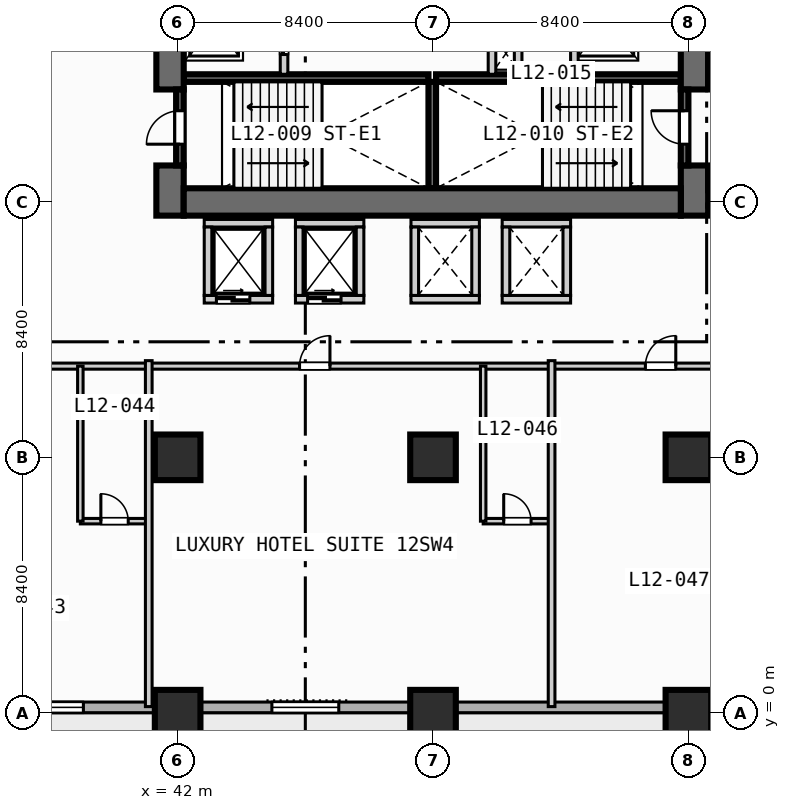
"""IFC4 building model, lengths in metres.
Left out: names, types, materials, properties, quantities, classifications, styles, units other than length and angle.
Written with IfcOpenShell. Run it as: python <this file> out.ifc"""

import sys

from ifc_helpers import new_model, si_unit, direction, frame, frame_2d, origin, origin_2d, place, context, subcontext, project, spatial, rectangle, extrude, element, fill, save


model = new_model("IFC4")
c1 = context("Model", 3, precision=1e-05, world=origin(), true_north=direction((0.0, 1.0)))
c2 = subcontext(c1, "Body", "Model", "MODEL_VIEW")
j1 = project(units=[si_unit("LENGTHUNIT", "METRE"), si_unit("PLANEANGLEUNIT", "RADIAN")], contexts=[c1])
p1 = place(None, origin())
s1 = spatial("IfcSite", under=j1, at=p1, CompositionType="ELEMENT")
p2 = place(p1, origin())
s2 = spatial("IfcBuilding", under=s1, at=p2, CompositionType="ELEMENT")
p3 = place(p2, frame((0.0, 0.0, 54.8)))
s3 = spatial("IfcBuildingStorey", under=s2, at=p3, CompositionType="ELEMENT", Elevation=54.8)
for number, where, z_axis, x_axis in (
    (1, (42.2, 20.875, 0.0), (0.0, 0.0, 1.0), (1.0, 0.0, 0.0)),
    (2, (50.5, 20.875, 0.0), (0.0, 0.0, 1.0), (1.0, 0.0, 0.0)),
):
    element("IfcWall", number, at=place(p3, frame(where, z_axis=z_axis, x_axis=x_axis)), inside=s3, PredefinedType="SOLIDWALL", context=c2, shape_type="SweptSolid", body=[
        extrude(rectangle(XDim=8.05, YDim=0.25, at=frame_2d((4.025, 0.0))), origin(), (0.0, 0.0, 1.0), 3.55),
    ])
p4 = place(p3, frame((50.375, 17.25, 0.0), z_axis=(0.0, 0.0, 1.0), x_axis=(0.0, 1.0, 0.0)))
e3 = element("IfcWall", 3, at=p4, inside=s3, PredefinedType="SOLIDWALL", context=c2, shape_type="SweptSolid", body=[
    extrude(rectangle(XDim=3.5, YDim=0.25, at=frame_2d((1.75, 0.0))), origin(), (0.0, 0.0, 1.0), 3.55),
])
p5 = place(p3, frame((41.75, 16.35, 0.0), z_axis=(0.0, 0.0, 1.0), x_axis=(0.0, 1.0, 0.0)))
e4 = element("IfcWall", 4, at=p5, inside=s3, PredefinedType="SHEAR", context=c2, shape_type="SweptSolid", body=[
    extrude(rectangle(XDim=1.65, YDim=0.9, at=frame_2d((0.825, 0.0))), origin(), (0.0, 0.0, 1.0), 3.55),
])
p6 = place(p3, frame((41.75, 20.5, 0.0), z_axis=(0.0, 0.0, 1.0), x_axis=(0.0, 1.0, 0.0)))
e5 = element("IfcWall", 5, at=p6, inside=s3, PredefinedType="SHEAR", context=c2, shape_type="SweptSolid", body=[
    extrude(rectangle(XDim=5.15, YDim=0.9, at=frame_2d((2.575, 0.0))), origin(), (0.0, 0.0, 1.0), 3.55),
])
p7 = place(p3, frame((59.0, 16.35, 0.0), z_axis=(0.0, 0.0, 1.0), x_axis=(0.0, 1.0, 0.0)))
e6 = element("IfcWall", 6, at=p7, inside=s3, PredefinedType="SHEAR", context=c2, shape_type="SweptSolid", body=[
    extrude(rectangle(XDim=1.65, YDim=0.9, at=frame_2d((0.825, 0.0))), origin(), (0.0, 0.0, 1.0), 3.55),
])
p8 = place(p3, frame((59.0, 20.5, 0.0), z_axis=(0.0, 0.0, 1.0), x_axis=(0.0, 1.0, 0.0)))
e7 = element("IfcWall", 7, at=p8, inside=s3, PredefinedType="SHEAR", context=c2, shape_type="SweptSolid", body=[
    extrude(rectangle(XDim=5.15, YDim=0.9, at=frame_2d((2.575, 0.0))), origin(), (0.0, 0.0, 1.0), 3.55),
])
p9 = place(p3, frame((42.2, 16.8, 0.0), z_axis=(0.0, 0.0, 1.0), x_axis=(1.0, 0.0, 0.0)))
e8 = element("IfcWall", 8, at=p9, inside=s3, PredefinedType="SHEAR", context=c2, shape_type="SweptSolid", body=[
    extrude(rectangle(XDim=16.35, YDim=0.9, at=frame_2d((8.175, 0.0))), origin(), (0.0, 0.0, 1.0), 3.55),
])
for number, where, z_axis, x_axis in (
    (9, (42.0, 0.0, 0.0), (0.0, 0.0, 1.0), (1.0, 0.0, 0.0)),
    (10, (42.0, 8.4, 0.0), (0.0, 0.0, 1.0), (1.0, 0.0, 0.0)),
    (11, (50.4, 0.0, 0.0), (0.0, 0.0, 1.0), (1.0, 0.0, 0.0)),
    (12, (50.4, 8.4, 0.0), (0.0, 0.0, 1.0), (1.0, 0.0, 0.0)),
    (13, (58.8, 0.0, 0.0), (0.0, 0.0, 1.0), (1.0, 0.0, 0.0)),
    (14, (58.8, 8.4, 0.0), (0.0, 0.0, 1.0), (1.0, 0.0, 0.0)),
):
    element("IfcColumn", number, at=place(p3, frame(where, z_axis=z_axis, x_axis=x_axis)), inside=s3, PredefinedType="COLUMN", context=c2, shape_type="SweptSolid", body=[
        extrude(rectangle(XDim=1.5, YDim=1.5, at=origin_2d()), origin(), (0.0, 0.0, 1.0), 3.8),
    ])
p10 = place(p3, frame((89.225, 0.175, 0.0), z_axis=(0.0, 0.0, 1.0), x_axis=(-1.0, 0.0, 0.0)))
e15 = element("IfcWall", 15, at=p10, inside=s3, PredefinedType="STANDARD", context=c2, shape_type="SweptSolid", body=[
    extrude(rectangle(XDim=86.05, YDim=0.35, at=frame_2d((43.025, 0.0))), origin(), (0.0, 0.0, 1.0), 3.55),
])
p11 = place(p10, frame((69.025, 0.0, 0.0)))
e16 = element("IfcOpeningElement", 16, at=p11, cuts=e15, PredefinedType="OPENING", context=c2, shape_type="SweptSolid", body=[
    extrude(rectangle(XDim=1.4, YDim=2.2, at=frame_2d((0.7, 1.1))), frame((0.0, 0.185, 0.0), z_axis=(0.0, -1.0, 0.0), x_axis=(1.0, 0.0, 0.0)), (0.0, 0.0, 1.0), 0.37),
])
p12 = place(p10, frame((58.725, 0.0, 0.85)))
e17 = element("IfcOpeningElement", 17, at=p12, cuts=e15, PredefinedType="OPENING", context=c2, shape_type="SweptSolid", body=[
    extrude(rectangle(XDim=2.2, YDim=1.8, at=frame_2d((1.1, 0.9))), frame((0.0, 0.185, 0.0), z_axis=(0.0, -1.0, 0.0), x_axis=(1.0, 0.0, 0.0)), (0.0, 0.0, 1.0), 0.37),
])
p13 = place(p10, frame((50.325, 0.0, 0.85)))
e18 = element("IfcOpeningElement", 18, at=p13, cuts=e15, PredefinedType="OPENING", context=c2, shape_type="SweptSolid", body=[
    extrude(rectangle(XDim=2.2, YDim=1.8, at=frame_2d((1.1, 0.9))), frame((0.0, 0.185, 0.0), z_axis=(0.0, -1.0, 0.0), x_axis=(1.0, 0.0, 0.0)), (0.0, 0.0, 1.0), 0.37),
])
p14 = place(p10, frame((41.925, 0.0, 0.85)))
e19 = element("IfcOpeningElement", 19, at=p14, cuts=e15, PredefinedType="OPENING", context=c2, shape_type="SweptSolid", body=[
    extrude(rectangle(XDim=2.2, YDim=1.8, at=frame_2d((1.1, 0.9))), frame((0.0, 0.185, 0.0), z_axis=(0.0, -1.0, 0.0), x_axis=(1.0, 0.0, 0.0)), (0.0, 0.0, 1.0), 0.37),
])
p15 = place(p10, frame((27.775, 0.0, 0.85)))
e20 = element("IfcOpeningElement", 20, at=p15, cuts=e15, PredefinedType="OPENING", context=c2, shape_type="SweptSolid", body=[
    extrude(rectangle(XDim=1.8, YDim=1.8, at=frame_2d((0.9, 0.9))), frame((0.0, 0.185, 0.0), z_axis=(0.0, -1.0, 0.0), x_axis=(1.0, 0.0, 0.0)), (0.0, 0.0, 1.0), 0.37),
])
p16 = place(p3, frame((42.075, 18.0, 0.0), z_axis=(0.0, 0.0, 1.0), x_axis=(0.0, 1.0, 0.0)))
e21 = element("IfcWall", 21, at=p16, inside=s3, PredefinedType="SOLIDWALL", context=c2, shape_type="SweptSolid", body=[
    extrude(rectangle(XDim=2.5, YDim=0.25, at=frame_2d((1.25, 0.0))), origin(), (0.0, 0.0, 1.0), 3.55),
])
p17 = place(p16, frame((0.7, 0.0, 0.0)))
e22 = element("IfcOpeningElement", 22, at=p17, cuts=e21, PredefinedType="OPENING", context=c2, shape_type="SweptSolid", body=[
    extrude(rectangle(XDim=1.1, YDim=2.15, at=frame_2d((0.55, 1.075))), frame((0.0, 0.135, 0.0), z_axis=(0.0, -1.0, 0.0), x_axis=(1.0, 0.0, 0.0)), (0.0, 0.0, 1.0), 0.27),
])
p18 = place(p3, frame((58.675, 18.0, 0.0), z_axis=(0.0, 0.0, 1.0), x_axis=(0.0, 1.0, 0.0)))
e23 = element("IfcWall", 23, at=p18, inside=s3, PredefinedType="SOLIDWALL", context=c2, shape_type="SweptSolid", body=[
    extrude(rectangle(XDim=2.5, YDim=0.25, at=frame_2d((1.25, 0.0))), origin(), (0.0, 0.0, 1.0), 3.55),
])
p19 = place(p18, frame((0.7, 0.0, 0.0)))
e24 = element("IfcOpeningElement", 24, at=p19, cuts=e23, PredefinedType="OPENING", context=c2, shape_type="SweptSolid", body=[
    extrude(rectangle(XDim=1.1, YDim=2.15, at=frame_2d((0.55, 1.075))), frame((0.0, 0.135, 0.0), z_axis=(0.0, -1.0, 0.0), x_axis=(1.0, 0.0, 0.0)), (0.0, 0.0, 1.0), 0.27),
])
p20 = place(p3, frame((45.5, 21.0, 0.0), z_axis=(0.0, 0.0, 1.0), x_axis=(0.0, 1.0, 0.0)))
e25 = element("IfcWall", 25, at=p20, inside=s3, PredefinedType="SOLIDWALL", context=c2, shape_type="SweptSolid", body=[
    extrude(rectangle(XDim=4.15, YDim=0.25, at=frame_2d((2.075, 0.0))), origin(), (0.0, 0.0, 1.0), 3.55),
])
p21 = place(p20, frame((0.65, 0.0, 0.0)))
e26 = element("IfcOpeningElement", 26, at=p21, cuts=e25, PredefinedType="OPENING", context=c2, shape_type="SweptSolid", body=[
    extrude(rectangle(XDim=1.1, YDim=2.15, at=frame_2d((0.55, 1.075))), frame((0.0, 0.135, 0.0), z_axis=(0.0, -1.0, 0.0), x_axis=(1.0, 0.0, 0.0)), (0.0, 0.0, 1.0), 0.27),
])
p22 = place(p3, frame((52.34, 21.0, 0.0), z_axis=(0.0, 0.0, 1.0), x_axis=(0.0, 1.0, 0.0)))
e27 = element("IfcWall", 27, at=p22, inside=s3, PredefinedType="SOLIDWALL", context=c2, shape_type="SweptSolid", body=[
    extrude(rectangle(XDim=3.75, YDim=0.25, at=frame_2d((1.875, 0.0))), origin(), (0.0, 0.0, 1.0), 3.55),
])
p23 = place(p3, frame((55.05, 21.0, 0.0), z_axis=(0.0, 0.0, 1.0), x_axis=(0.0, 1.0, 0.0)))
e28 = element("IfcWall", 28, at=p23, inside=s3, PredefinedType="SOLIDWALL", context=c2, shape_type="SweptSolid", body=[
    extrude(rectangle(XDim=4.15, YDim=0.25, at=frame_2d((2.075, 0.0))), origin(), (0.0, 0.0, 1.0), 3.55),
])
p24 = place(p23, frame((1.85, 0.0, 0.0)))
e29 = element("IfcOpeningElement", 29, at=p24, cuts=e28, PredefinedType="OPENING", context=c2, shape_type="SweptSolid", body=[
    extrude(rectangle(XDim=1.1, YDim=2.15, at=frame_2d((0.55, 1.075))), frame((0.0, 0.135, 0.0), z_axis=(0.0, -1.0, 0.0), x_axis=(1.0, 0.0, 0.0)), (0.0, 0.0, 1.0), 0.27),
])
p25 = place(p3, frame((53.2, 21.0, 0.0), z_axis=(0.0, 0.0, 1.0), x_axis=(0.0, 1.0, 0.0)))
e30 = element("IfcWall", 30, at=p25, inside=s3, PredefinedType="SOLIDWALL", context=c2, shape_type="SweptSolid", body=[
    extrude(rectangle(XDim=1.3, YDim=0.25, at=frame_2d((0.65, 0.0))), origin(), (0.0, 0.0, 1.0), 3.55),
])
p26 = place(p3, frame((42.875, 13.6, 0.0), z_axis=(0.0, 0.0, 1.0), x_axis=(1.0, 0.0, 0.0)))
e31 = element("IfcWall", 31, at=p26, inside=s3, PredefinedType="SOLIDWALL", context=c2, shape_type="SweptSolid", body=[
    extrude(rectangle(XDim=2.25, YDim=0.25, at=frame_2d((1.125, 0.0))), origin(), (0.0, 0.0, 1.0), 3.55),
])
p27 = place(p26, frame((0.4, 0.0, 0.0)))
e32 = element("IfcOpeningElement", 32, at=p27, cuts=e31, PredefinedType="OPENING", context=c2, shape_type="SweptSolid", body=[
    extrude(rectangle(XDim=1.1, YDim=2.15, at=frame_2d((0.55, 1.075))), frame((0.0, 0.135, 0.0), z_axis=(0.0, -1.0, 0.0), x_axis=(1.0, 0.0, 0.0)), (0.0, 0.0, 1.0), 0.27),
])
for number, where, z_axis, x_axis in (
    (33, (42.875, 16.1, 0.0), (0.0, 0.0, 1.0), (1.0, 0.0, 0.0)),
    (34, (43.0, 13.725, 0.0), (0.0, 0.0, 1.0), (0.0, 1.0, 0.0)),
    (35, (45.0, 13.725, 0.0), (0.0, 0.0, 1.0), (0.0, 1.0, 0.0)),
):
    element("IfcWall", number, at=place(p3, frame(where, z_axis=z_axis, x_axis=x_axis)), inside=s3, PredefinedType="SOLIDWALL", context=c2, shape_type="SweptSolid", body=[
        extrude(rectangle(XDim=2.25, YDim=0.25, at=frame_2d((1.125, 0.0))), origin(), (0.0, 0.0, 1.0), 3.55),
    ])
p28 = place(p3, frame((45.875, 13.6, 0.0), z_axis=(0.0, 0.0, 1.0), x_axis=(1.0, 0.0, 0.0)))
e36 = element("IfcWall", 36, at=p28, inside=s3, PredefinedType="SOLIDWALL", context=c2, shape_type="SweptSolid", body=[
    extrude(rectangle(XDim=2.25, YDim=0.25, at=frame_2d((1.125, 0.0))), origin(), (0.0, 0.0, 1.0), 3.55),
])
p29 = place(p28, frame((0.4, 0.0, 0.0)))
e37 = element("IfcOpeningElement", 37, at=p29, cuts=e36, PredefinedType="OPENING", context=c2, shape_type="SweptSolid", body=[
    extrude(rectangle(XDim=1.1, YDim=2.15, at=frame_2d((0.55, 1.075))), frame((0.0, 0.135, 0.0), z_axis=(0.0, -1.0, 0.0), x_axis=(1.0, 0.0, 0.0)), (0.0, 0.0, 1.0), 0.27),
])
for number, where, z_axis, x_axis in (
    (38, (45.875, 16.1, 0.0), (0.0, 0.0, 1.0), (1.0, 0.0, 0.0)),
    (39, (46.0, 13.725, 0.0), (0.0, 0.0, 1.0), (0.0, 1.0, 0.0)),
    (40, (48.0, 13.725, 0.0), (0.0, 0.0, 1.0), (0.0, 1.0, 0.0)),
    (41, (49.675, 13.6, 0.0), (0.0, 0.0, 1.0), (1.0, 0.0, 0.0)),
    (42, (49.675, 16.1, 0.0), (0.0, 0.0, 1.0), (1.0, 0.0, 0.0)),
    (43, (49.8, 13.725, 0.0), (0.0, 0.0, 1.0), (0.0, 1.0, 0.0)),
    (44, (51.8, 13.725, 0.0), (0.0, 0.0, 1.0), (0.0, 1.0, 0.0)),
    (45, (52.675, 13.6, 0.0), (0.0, 0.0, 1.0), (1.0, 0.0, 0.0)),
    (46, (52.675, 16.1, 0.0), (0.0, 0.0, 1.0), (1.0, 0.0, 0.0)),
    (47, (52.8, 13.725, 0.0), (0.0, 0.0, 1.0), (0.0, 1.0, 0.0)),
    (48, (54.8, 13.725, 0.0), (0.0, 0.0, 1.0), (0.0, 1.0, 0.0)),
):
    element("IfcWall", number, at=place(p3, frame(where, z_axis=z_axis, x_axis=x_axis)), inside=s3, PredefinedType="SOLIDWALL", context=c2, shape_type="SweptSolid", body=[
        extrude(rectangle(XDim=2.25, YDim=0.25, at=frame_2d((1.125, 0.0))), origin(), (0.0, 0.0, 1.0), 3.55),
    ])
p30 = place(p3, frame((13.5, 11.4, 0.0), z_axis=(0.0, 0.0, 1.0), x_axis=(1.0, 0.0, 0.0)))
e49 = element("IfcWall", 49, at=p30, inside=s3, PredefinedType="PARTITIONING", context=c2, shape_type="SweptSolid", body=[
    extrude(rectangle(XDim=50.3, YDim=0.2, at=frame_2d((25.15, 0.0))), origin(), (0.0, 0.0, 1.0), 3.55),
])
p31 = place(p30, frame((2.135, 0.0, 0.0)))
e50 = element("IfcOpeningElement", 50, at=p31, cuts=e49, PredefinedType="OPENING", context=c2, shape_type="SweptSolid", body=[
    extrude(rectangle(XDim=1.0, YDim=2.15, at=frame_2d((0.5, 1.075))), frame((0.0, 0.11, 0.0), z_axis=(0.0, -1.0, 0.0), x_axis=(1.0, 0.0, 0.0)), (0.0, 0.0, 1.0), 0.22),
])
p32 = place(p30, frame((14.665, 0.0, 0.0)))
e51 = element("IfcOpeningElement", 51, at=p32, cuts=e49, PredefinedType="OPENING", context=c2, shape_type="SweptSolid", body=[
    extrude(rectangle(XDim=1.0, YDim=2.15, at=frame_2d((0.5, 1.075))), frame((0.0, 0.11, 0.0), z_axis=(0.0, -1.0, 0.0), x_axis=(1.0, 0.0, 0.0)), (0.0, 0.0, 1.0), 0.22),
])
p33 = place(p30, frame((22.31, 0.0, 0.0)))
e52 = element("IfcOpeningElement", 52, at=p33, cuts=e49, PredefinedType="OPENING", context=c2, shape_type="SweptSolid", body=[
    extrude(rectangle(XDim=1.0, YDim=2.15, at=frame_2d((0.5, 1.075))), frame((0.0, 0.11, 0.0), z_axis=(0.0, -1.0, 0.0), x_axis=(1.0, 0.0, 0.0)), (0.0, 0.0, 1.0), 0.22),
])
p34 = place(p30, frame((32.51, 0.0, 0.0)))
e53 = element("IfcOpeningElement", 53, at=p34, cuts=e49, PredefinedType="OPENING", context=c2, shape_type="SweptSolid", body=[
    extrude(rectangle(XDim=1.0, YDim=2.15, at=frame_2d((0.5, 1.075))), frame((0.0, 0.11, 0.0), z_axis=(0.0, -1.0, 0.0), x_axis=(1.0, 0.0, 0.0)), (0.0, 0.0, 1.0), 0.22),
])
p35 = place(p30, frame((43.885, 0.0, 0.0)))
e54 = element("IfcOpeningElement", 54, at=p35, cuts=e49, PredefinedType="OPENING", context=c2, shape_type="SweptSolid", body=[
    extrude(rectangle(XDim=1.0, YDim=2.15, at=frame_2d((0.5, 1.075))), frame((0.0, 0.11, 0.0), z_axis=(0.0, -1.0, 0.0), x_axis=(1.0, 0.0, 0.0)), (0.0, 0.0, 1.0), 0.22),
])
p36 = place(p3, frame((38.8, 6.3, 0.0), z_axis=(0.0, 0.0, 1.0), x_axis=(1.0, 0.0, 0.0)))
e55 = element("IfcWall", 55, at=p36, inside=s3, PredefinedType="PLUMBINGWALL", context=c2, shape_type="SweptSolid", body=[
    extrude(rectangle(XDim=2.25, YDim=0.18, at=frame_2d((1.125, 0.0))), origin(), (0.0, 0.0, 1.0), 3.55),
])
p37 = place(p36, frame((0.675, 0.0, 0.0)))
e56 = element("IfcOpeningElement", 56, at=p37, cuts=e55, PredefinedType="OPENING", context=c2, shape_type="SweptSolid", body=[
    extrude(rectangle(XDim=0.9, YDim=2.1, at=frame_2d((0.45, 1.05))), frame((0.0, 0.1, 0.0), z_axis=(0.0, -1.0, 0.0), x_axis=(1.0, 0.0, 0.0)), (0.0, 0.0, 1.0), 0.2),
])
p38 = place(p3, frame((38.8, 6.3, 0.0), z_axis=(0.0, 0.0, 1.0), x_axis=(0.0, 1.0, 0.0)))
e57 = element("IfcWall", 57, at=p38, inside=s3, PredefinedType="PLUMBINGWALL", context=c2, shape_type="SweptSolid", body=[
    extrude(rectangle(XDim=5.1, YDim=0.18, at=frame_2d((2.55, 0.0))), origin(), (0.0, 0.0, 1.0), 3.55),
])
p39 = place(p3, frame((41.05, 0.2, 0.0), z_axis=(0.0, 0.0, 1.0), x_axis=(0.0, 1.0, 0.0)))
e58 = element("IfcWall", 58, at=p39, inside=s3, PredefinedType="PARTITIONING", context=c2, shape_type="SweptSolid", body=[
    extrude(rectangle(XDim=11.38, YDim=0.22, at=frame_2d((5.69, 0.0))), origin(), (0.0, 0.0, 1.0), 3.55),
])
p40 = place(p3, frame((52.05, 6.3, 0.0), z_axis=(0.0, 0.0, 1.0), x_axis=(1.0, 0.0, 0.0)))
e59 = element("IfcWall", 59, at=p40, inside=s3, PredefinedType="PLUMBINGWALL", context=c2, shape_type="SweptSolid", body=[
    extrude(rectangle(XDim=2.25, YDim=0.18, at=frame_2d((1.125, 0.0))), origin(), (0.0, 0.0, 1.0), 3.55),
])
p41 = place(p40, frame((0.675, 0.0, 0.0)))
e60 = element("IfcOpeningElement", 60, at=p41, cuts=e59, PredefinedType="OPENING", context=c2, shape_type="SweptSolid", body=[
    extrude(rectangle(XDim=0.9, YDim=2.1, at=frame_2d((0.45, 1.05))), frame((0.0, 0.1, 0.0), z_axis=(0.0, -1.0, 0.0), x_axis=(1.0, 0.0, 0.0)), (0.0, 0.0, 1.0), 0.2),
])
p42 = place(p3, frame((52.05, 6.3, 0.0), z_axis=(0.0, 0.0, 1.0), x_axis=(0.0, 1.0, 0.0)))
e61 = element("IfcWall", 61, at=p42, inside=s3, PredefinedType="PLUMBINGWALL", context=c2, shape_type="SweptSolid", body=[
    extrude(rectangle(XDim=5.1, YDim=0.18, at=frame_2d((2.55, 0.0))), origin(), (0.0, 0.0, 1.0), 3.55),
])
p43 = place(p3, frame((54.3, 0.2, 0.0), z_axis=(0.0, 0.0, 1.0), x_axis=(0.0, 1.0, 0.0)))
e62 = element("IfcWall", 62, at=p43, inside=s3, PredefinedType="PARTITIONING", context=c2, shape_type="SweptSolid", body=[
    extrude(rectangle(XDim=11.38, YDim=0.22, at=frame_2d((5.69, 0.0))), origin(), (0.0, 0.0, 1.0), 3.55),
])
p44 = place(p13, origin())
e63 = element("IfcWindow", 63, at=p44, inside=s3, PartitioningType="SINGLE_PANEL", PredefinedType="WINDOW", context=c2, shape_type="SweptSolid", body=[
    extrude(rectangle(XDim=2.2, YDim=1.8, at=frame_2d((1.1, 0.9))), frame((0.0, 0.03, 0.0), z_axis=(0.0, -1.0, 0.0), x_axis=(1.0, 0.0, 0.0)), (0.0, 0.0, 1.0), 0.06),
])
fill(e18, e63)
p45 = place(p14, origin())
e64 = element("IfcWindow", 64, at=p45, inside=s3, PartitioningType="SINGLE_PANEL", PredefinedType="WINDOW", context=c2, shape_type="SweptSolid", body=[
    extrude(rectangle(XDim=2.2, YDim=1.8, at=frame_2d((1.1, 0.9))), frame((0.0, 0.03, 0.0), z_axis=(0.0, -1.0, 0.0), x_axis=(1.0, 0.0, 0.0)), (0.0, 0.0, 1.0), 0.06),
])
fill(e19, e64)
p46 = place(p17, origin())
e65 = element("IfcDoor", 65, at=p46, inside=s3, OperationType="SINGLE_SWING_LEFT", PredefinedType="DOOR", context=c2, shape_type="SweptSolid", body=[
    extrude(rectangle(XDim=1.1, YDim=2.15, at=frame_2d((0.55, 1.075))), frame((0.0, 0.025, 0.0), z_axis=(0.0, -1.0, 0.0), x_axis=(1.0, 0.0, 0.0)), (0.0, 0.0, 1.0), 0.05),
])
fill(e22, e65)
p47 = place(p19, origin())
e66 = element("IfcDoor", 66, at=p47, inside=s3, OperationType="SINGLE_SWING_RIGHT", PredefinedType="DOOR", context=c2, shape_type="SweptSolid", body=[
    extrude(rectangle(XDim=1.1, YDim=2.15, at=frame_2d((0.55, 1.075))), frame((0.0, 0.025, 0.0), z_axis=(0.0, -1.0, 0.0), x_axis=(1.0, 0.0, 0.0)), (0.0, 0.0, 1.0), 0.05),
])
fill(e24, e66)
p48 = place(p21, origin())
e67 = element("IfcDoor", 67, at=p48, inside=s3, OperationType="SLIDING_TO_LEFT", PredefinedType="DOOR", context=c2, shape_type="SweptSolid", body=[
    extrude(rectangle(XDim=1.1, YDim=2.15, at=frame_2d((0.55, 1.075))), frame((0.0, 0.025, 0.0), z_axis=(0.0, -1.0, 0.0), x_axis=(1.0, 0.0, 0.0)), (0.0, 0.0, 1.0), 0.05),
])
fill(e26, e67)
p49 = place(p27, origin())
e68 = element("IfcDoor", 68, at=p49, inside=s3, OperationType="SLIDING_TO_LEFT", PredefinedType="DOOR", context=c2, shape_type="SweptSolid", body=[
    extrude(rectangle(XDim=1.1, YDim=2.15, at=frame_2d((0.55, 1.075))), frame((0.0, 0.025, 0.0), z_axis=(0.0, -1.0, 0.0), x_axis=(1.0, 0.0, 0.0)), (0.0, 0.0, 1.0), 0.05),
])
fill(e32, e68)
p50 = place(p29, origin())
e69 = element("IfcDoor", 69, at=p50, inside=s3, OperationType="SLIDING_TO_LEFT", PredefinedType="DOOR", context=c2, shape_type="SweptSolid", body=[
    extrude(rectangle(XDim=1.1, YDim=2.15, at=frame_2d((0.55, 1.075))), frame((0.0, 0.025, 0.0), z_axis=(0.0, -1.0, 0.0), x_axis=(1.0, 0.0, 0.0)), (0.0, 0.0, 1.0), 0.05),
])
fill(e37, e69)
p51 = place(p34, origin())
e70 = element("IfcDoor", 70, at=p51, inside=s3, OperationType="SINGLE_SWING_RIGHT", PredefinedType="DOOR", context=c2, shape_type="SweptSolid", body=[
    extrude(rectangle(XDim=1.0, YDim=2.15, at=frame_2d((0.5, 1.075))), frame((0.0, 0.025, 0.0), z_axis=(0.0, -1.0, 0.0), x_axis=(1.0, 0.0, 0.0)), (0.0, 0.0, 1.0), 0.05),
])
fill(e53, e70)
p52 = place(p35, origin())
e71 = element("IfcDoor", 71, at=p52, inside=s3, OperationType="SINGLE_SWING_RIGHT", PredefinedType="DOOR", context=c2, shape_type="SweptSolid", body=[
    extrude(rectangle(XDim=1.0, YDim=2.15, at=frame_2d((0.5, 1.075))), frame((0.0, 0.025, 0.0), z_axis=(0.0, -1.0, 0.0), x_axis=(1.0, 0.0, 0.0)), (0.0, 0.0, 1.0), 0.05),
])
fill(e54, e71)
p53 = place(p37, origin())
e72 = element("IfcDoor", 72, at=p53, inside=s3, OperationType="SINGLE_SWING_LEFT", PredefinedType="DOOR", context=c2, shape_type="SweptSolid", body=[
    extrude(rectangle(XDim=0.9, YDim=2.1, at=frame_2d((0.45, 1.05))), frame((0.0, 0.025, 0.0), z_axis=(0.0, -1.0, 0.0), x_axis=(1.0, 0.0, 0.0)), (0.0, 0.0, 1.0), 0.05),
])
fill(e56, e72)
p54 = place(p41, origin())
e73 = element("IfcDoor", 73, at=p54, inside=s3, OperationType="SINGLE_SWING_LEFT", PredefinedType="DOOR", context=c2, shape_type="SweptSolid", body=[
    extrude(rectangle(XDim=0.9, YDim=2.1, at=frame_2d((0.45, 1.05))), frame((0.0, 0.025, 0.0), z_axis=(0.0, -1.0, 0.0), x_axis=(1.0, 0.0, 0.0)), (0.0, 0.0, 1.0), 0.05),
])
fill(e60, e73)
save(model, sys.argv[1])
